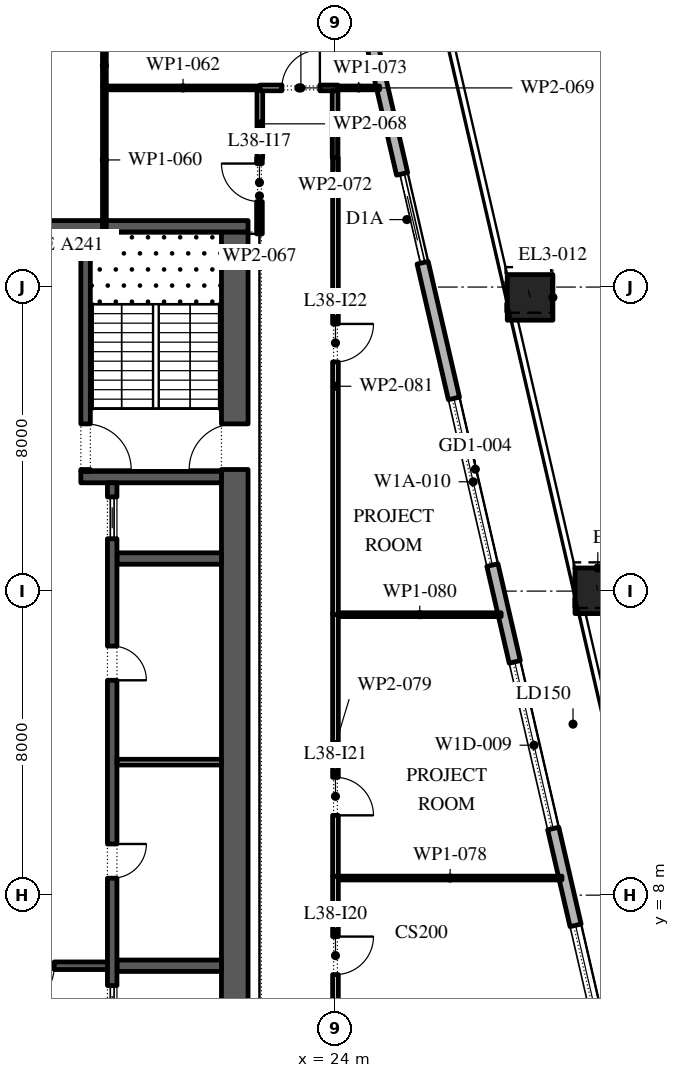
"""IFC4 building model, lengths in metres.
Left out: names, types, materials, properties, quantities, classifications, styles, units other than length and angle.
Written with IfcOpenShell. Run it as: python <this file> out.ifc"""

import sys

from ifc_helpers import new_model, si_unit, direction, frame, frame_2d, origin, origin_2d, place, context, subcontext, project, spatial, rectangle, extrude, element, fill, save


model = new_model("IFC4")
c1 = context("Model", 3, precision=1e-05, world=origin(), true_north=direction((0.0, 1.0)))
c2 = subcontext(c1, "Body", "Model", "MODEL_VIEW")
j1 = project(units=[si_unit("LENGTHUNIT", "METRE"), si_unit("PLANEANGLEUNIT", "RADIAN")], contexts=[c1])
p1 = place(None, origin())
s1 = spatial("IfcSite", under=j1, at=p1, CompositionType="ELEMENT")
p2 = place(p1, origin())
s2 = spatial("IfcBuilding", under=s1, at=p2, CompositionType="ELEMENT")
p3 = place(p2, frame((0.0, 0.0, 175.8)))
s3 = spatial("IfcBuildingStorey", under=s2, at=p3, CompositionType="ELEMENT", Elevation=175.8)
p4 = place(p3, frame((30.903, 16.009, 0.0), z_axis=(-0.0080747472, 0.035087390713, 0.999351626541), x_axis=(-0.974526982896, -0.224270282488, 0.0)))
e1 = element("IfcColumn", 1, at=p4, inside=s3, PredefinedType="COLUMN", context=c2, shape_type="SweptSolid", body=[
    extrude(rectangle(XDim=1.2, YDim=1.2, at=origin_2d()), origin(), (0.0, 0.0, 1.0), 4.203),
])
p5 = place(p3, frame((29.121, 23.728, 0.0), z_axis=(-0.010799619665, 0.046740289408, 0.998848694028), x_axis=(-0.974329962248, -0.225124686929, 0.0)))
e2 = element("IfcColumn", 2, at=p5, inside=s3, PredefinedType="COLUMN", context=c2, shape_type="SweptSolid", body=[
    extrude(rectangle(XDim=1.2, YDim=1.2, at=origin_2d()), origin(), (0.0, 0.0, 1.0), 4.205),
])
p6 = place(p3, frame((33.157, -5.092, 0.0), z_axis=(0.0, 0.0, 1.0), x_axis=(-0.224950279389, 0.974370243697, 0.0)))
e3 = element("IfcWall", 3, at=p6, inside=s3, PredefinedType="STANDARD", context=c2, shape_type="SweptSolid", body=[
    extrude(rectangle(XDim=49.5, YDim=0.3, at=frame_2d((24.75, 0.0))), origin(), (0.0, 0.0, 1.0), 4.0),
])
p7 = place(p6, frame((2.207, 0.0, 0.0)))
e4 = element("IfcOpeningElement", 4, at=p7, cuts=e3, PredefinedType="OPENING", context=c2, shape_type="SweptSolid", body=[
    extrude(rectangle(XDim=2.4, YDim=3.125, at=frame_2d((1.2, 1.562))), frame((0.0, 0.16, 0.0), z_axis=(0.0, -1.0, 0.0), x_axis=(1.0, 0.0, 0.0)), (0.0, 0.0, 1.0), 0.32),
])
p8 = place(p6, frame((8.121, 0.0, 0.45)))
e5 = element("IfcOpeningElement", 5, at=p8, cuts=e3, PredefinedType="OPENING", context=c2, shape_type="SweptSolid", body=[
    extrude(rectangle(XDim=4.5, YDim=2.875, at=frame_2d((2.25, 1.438))), frame((0.0, 0.16, 0.0), z_axis=(0.0, -1.0, 0.0), x_axis=(1.0, 0.0, 0.0)), (0.0, 0.0, 1.0), 0.32),
])
p9 = place(p6, frame((15.236, 0.0, 0.45)))
e6 = element("IfcOpeningElement", 6, at=p9, cuts=e3, PredefinedType="OPENING", context=c2, shape_type="SweptSolid", body=[
    extrude(rectangle(XDim=4.5, YDim=2.875, at=frame_2d((2.25, 1.438))), frame((0.0, 0.16, 0.0), z_axis=(0.0, -1.0, 0.0), x_axis=(1.0, 0.0, 0.0)), (0.0, 0.0, 1.0), 0.32),
])
p10 = place(p6, frame((22.35, 0.0, 0.45)))
e7 = element("IfcOpeningElement", 7, at=p10, cuts=e3, PredefinedType="OPENING", context=c2, shape_type="SweptSolid", body=[
    extrude(rectangle(XDim=4.5, YDim=3.0, at=frame_2d((2.25, 1.5))), frame((0.0, 0.16, 0.0), z_axis=(0.0, -1.0, 0.0), x_axis=(1.0, 0.0, 0.0)), (0.0, 0.0, 1.0), 0.32),
])
p11 = place(p6, frame((30.514, 0.0, 0.0)))
e8 = element("IfcOpeningElement", 8, at=p11, cuts=e3, PredefinedType="OPENING", context=c2, shape_type="SweptSolid", body=[
    extrude(rectangle(XDim=2.4, YDim=3.45, at=frame_2d((1.2, 1.725))), frame((0.0, 0.16, 0.0), z_axis=(0.0, -1.0, 0.0), x_axis=(1.0, 0.0, 0.0)), (0.0, 0.0, 1.0), 0.32),
])
p12 = place(p6, frame((36.579, 0.0, 0.45)))
e9 = element("IfcOpeningElement", 9, at=p12, cuts=e3, PredefinedType="OPENING", context=c2, shape_type="SweptSolid", body=[
    extrude(rectangle(XDim=4.5, YDim=3.05, at=frame_2d((2.25, 1.525))), frame((0.0, 0.16, 0.0), z_axis=(0.0, -1.0, 0.0), x_axis=(1.0, 0.0, 0.0)), (0.0, 0.0, 1.0), 0.32),
])
p13 = place(p6, frame((43.693, 0.0, 0.45)))
e10 = element("IfcOpeningElement", 10, at=p13, cuts=e3, PredefinedType="OPENING", context=c2, shape_type="SweptSolid", body=[
    extrude(rectangle(XDim=4.5, YDim=3.05, at=frame_2d((2.25, 1.525))), frame((0.0, 0.16, 0.0), z_axis=(0.0, -1.0, 0.0), x_axis=(1.0, 0.0, 0.0)), (0.0, 0.0, 1.0), 0.32),
])
p14 = place(p3, frame((21.35, -2.45, 0.0), z_axis=(0.0, 0.0, 1.0), x_axis=(0.0, 1.0, 0.0)))
e11 = element("IfcWall", 11, at=p14, inside=s3, PredefinedType="SHEAR", context=c2, shape_type="SweptSolid", body=[
    extrude(rectangle(XDim=27.9, YDim=0.7, at=frame_2d((13.95, 0.0))), origin(), (0.0, 0.0, 1.0), 4.0),
])
p15 = place(p14, frame((5.05, 0.0, 0.0)))
e12 = element("IfcOpeningElement", 12, at=p15, cuts=e11, PredefinedType="OPENING", context=c2, shape_type="SweptSolid", body=[
    extrude(rectangle(XDim=1.2, YDim=2.1, at=frame_2d((0.6, 1.05))), frame((0.0, 0.36, 0.0), z_axis=(0.0, -1.0, 0.0), x_axis=(1.0, 0.0, 0.0)), (0.0, 0.0, 1.0), 0.72),
])
p16 = place(p14, frame((21.65, 0.0, 0.0)))
e13 = element("IfcOpeningElement", 13, at=p16, cuts=e11, PredefinedType="OPENING", context=c2, shape_type="SweptSolid", body=[
    extrude(rectangle(XDim=1.2, YDim=2.1, at=frame_2d((0.6, 1.05))), frame((0.0, 0.36, 0.0), z_axis=(0.0, -1.0, 0.0), x_axis=(1.0, 0.0, 0.0)), (0.0, 0.0, 1.0), 0.72),
])
p17 = place(p3, frame((10.3, 25.6, 0.0), z_axis=(0.0, 0.0, 1.0), x_axis=(1.0, 0.0, 0.0)))
e14 = element("IfcWall", 14, at=p17, inside=s3, PredefinedType="SHEAR", context=c2, shape_type="SweptSolid", body=[
    extrude(rectangle(XDim=11.4, YDim=0.3, at=frame_2d((5.7, 0.0))), origin(), (0.0, 0.0, 1.0), 4.0),
])
p18 = place(p3, frame((17.3, 19.0, 0.0), z_axis=(0.0, 0.0, 1.0), x_axis=(1.0, 0.0, 0.0)))
e15 = element("IfcWall", 15, at=p18, inside=s3, PredefinedType="SHEAR", context=c2, shape_type="SweptSolid", body=[
    extrude(rectangle(XDim=3.7, YDim=0.3, at=frame_2d((1.85, 0.0))), origin(), (0.0, 0.0, 1.0), 4.0),
])
p19 = place(p3, frame((17.425, 19.15, 0.0), z_axis=(0.0, 0.0, 1.0), x_axis=(0.0, 1.0, 0.0)))
e16 = element("IfcWall", 16, at=p19, inside=s3, PredefinedType="SHEAR", context=c2, shape_type="SweptSolid", body=[
    extrude(rectangle(XDim=6.3, YDim=0.25, at=frame_2d((3.15, 0.0))), origin(), (0.0, 0.0, 1.0), 4.0),
])
p20 = place(p19, frame((0.05, 0.0, 0.0)))
e17 = element("IfcOpeningElement", 17, at=p20, cuts=e16, PredefinedType="OPENING", context=c2, shape_type="SweptSolid", body=[
    extrude(rectangle(XDim=1.2, YDim=2.1, at=frame_2d((0.6, 1.05))), frame((0.0, 0.135, 0.0), z_axis=(0.0, -1.0, 0.0), x_axis=(1.0, 0.0, 0.0)), (0.0, 0.0, 1.0), 0.27),
])
for number, where, z_axis, x_axis in (
    (18, (18.25, 6.143, 0.0), (0.0, 0.0, 1.0), (1.0, 0.0, 0.0)),
    (19, (18.25, 16.857, 0.0), (0.0, 0.0, 1.0), (1.0, 0.0, 0.0)),
):
    element("IfcWall", number, at=place(p3, frame(where, z_axis=z_axis, x_axis=x_axis)), inside=s3, PredefinedType="SHEAR", context=c2, shape_type="SweptSolid", body=[
        extrude(rectangle(XDim=2.75, YDim=0.3, at=frame_2d((1.375, 0.0))), origin(), (0.0, 0.0, 1.0), 4.0),
    ])
p21 = place(p3, frame((18.125, 4.15, 0.0), z_axis=(0.0, 0.0, 1.0), x_axis=(0.0, 1.0, 0.0)))
e20 = element("IfcWall", 20, at=p21, inside=s3, PredefinedType="SHEAR", context=c2, shape_type="SweptSolid", body=[
    extrude(rectangle(XDim=14.7, YDim=0.25, at=frame_2d((7.35, 0.0))), origin(), (0.0, 0.0, 1.0), 4.0),
])
p22 = place(p21, frame((4.296, 0.0, 0.0)))
e21 = element("IfcOpeningElement", 21, at=p22, cuts=e20, PredefinedType="OPENING", context=c2, shape_type="SweptSolid", body=[
    extrude(rectangle(XDim=0.9, YDim=2.1, at=frame_2d((0.45, 1.05))), frame((0.0, 0.135, 0.0), z_axis=(0.0, -1.0, 0.0), x_axis=(1.0, 0.0, 0.0)), (0.0, 0.0, 1.0), 0.27),
])
p23 = place(p21, frame((9.504, 0.0, 0.0)))
e22 = element("IfcOpeningElement", 22, at=p23, cuts=e20, PredefinedType="OPENING", context=c2, shape_type="SweptSolid", body=[
    extrude(rectangle(XDim=0.9, YDim=2.1, at=frame_2d((0.45, 1.05))), frame((0.0, 0.135, 0.0), z_axis=(0.0, -1.0, 0.0), x_axis=(1.0, 0.0, 0.0)), (0.0, 0.0, 1.0), 0.27),
])
p24 = place(p21, frame((0.371, 0.0, 0.0)))
e23 = element("IfcOpeningElement", 23, at=p24, cuts=e20, PredefinedType="OPENING", context=c2, shape_type="SweptSolid", body=[
    extrude(rectangle(XDim=1.1, YDim=2.1, at=frame_2d((0.55, 1.05))), frame((0.0, 0.135, 0.0), z_axis=(0.0, -1.0, 0.0), x_axis=(1.0, 0.0, 0.0)), (0.0, 0.0, 1.0), 0.27),
])
p25 = place(p21, frame((13.229, 0.0, 0.0)))
e24 = element("IfcOpeningElement", 24, at=p25, cuts=e20, PredefinedType="OPENING", context=c2, shape_type="SweptSolid", body=[
    extrude(rectangle(XDim=1.1, YDim=2.1, at=frame_2d((0.55, 1.05))), frame((0.0, 0.135, 0.0), z_axis=(0.0, -1.0, 0.0), x_axis=(1.0, 0.0, 0.0)), (0.0, 0.0, 1.0), 0.27),
])
p26 = place(p3, frame((18.25, 11.5, 0.0), z_axis=(0.0, 0.0, 1.0), x_axis=(1.0, 0.0, 0.0)))
e25 = element("IfcWall", 25, at=p26, inside=s3, PredefinedType="PARTITIONING", context=c2, shape_type="SweptSolid", body=[
    extrude(rectangle(XDim=2.75, YDim=0.15, at=frame_2d((1.375, 0.0))), origin(), (0.0, 0.0, 1.0), 4.0),
])
p27 = place(p3, frame((14.0, 6.143, 0.0), z_axis=(0.0, 0.0, 1.0), x_axis=(1.0, 0.0, 0.0)))
e26 = element("IfcWall", 26, at=p27, inside=s3, PredefinedType="SHEAR", context=c2, shape_type="SweptSolid", body=[
    extrude(rectangle(XDim=4.0, YDim=0.2, at=frame_2d((2.0, 0.0))), origin(), (0.0, 0.0, 1.0), 4.0),
])
p28 = place(p27, frame((1.4, 0.0, 0.0)))
e27 = element("IfcOpeningElement", 27, at=p28, cuts=e26, PredefinedType="OPENING", context=c2, shape_type="SweptSolid", body=[
    extrude(rectangle(XDim=1.2, YDim=2.1, at=frame_2d((0.6, 1.05))), frame((0.0, 0.11, 0.0), z_axis=(0.0, -1.0, 0.0), x_axis=(1.0, 0.0, 0.0)), (0.0, 0.0, 1.0), 0.22),
])
p29 = place(p3, frame((17.92, 25.4, 0.0), z_axis=(0.0, 0.0, 1.0), x_axis=(0.0, 1.0, 0.0)))
e28 = element("IfcWall", 28, at=p29, inside=s3, PredefinedType="PARTITIONING", context=c2, shape_type="SweptSolid", body=[
    extrude(rectangle(XDim=3.89, YDim=0.1, at=frame_2d((1.945, 0.0))), origin(), (0.0, 0.0, 1.0), 4.0),
])
p30 = place(p3, frame((17.92, 29.29, 0.0), z_axis=(0.0, 0.0, 1.0), x_axis=(0.0, 1.0, 0.0)))
e29 = element("IfcWall", 29, at=p30, inside=s3, PredefinedType="PARTITIONING", context=c2, shape_type="SweptSolid", body=[
    extrude(rectangle(XDim=1.08, YDim=0.1, at=frame_2d((0.54, 0.0))), origin(), (0.0, 0.0, 1.0), 4.0),
])
p31 = place(p3, frame((17.97, 29.24, 0.0), z_axis=(0.0, 0.0, 1.0), x_axis=(1.0, 0.0, 0.0)))
e30 = element("IfcWall", 30, at=p31, inside=s3, PredefinedType="PARTITIONING", context=c2, shape_type="SweptSolid", body=[
    extrude(rectangle(XDim=4.04, YDim=0.1, at=frame_2d((2.02, 0.0))), origin(), (0.0, 0.0, 1.0), 4.0),
])
p32 = place(p3, frame((22.0, 25.4, 0.0), z_axis=(0.0, 0.0, 1.0), x_axis=(0.0, 1.0, 0.0)))
e31 = element("IfcWall", 31, at=p32, inside=s3, PredefinedType="PARTITIONING", context=c2, shape_type="SweptSolid", body=[
    extrude(rectangle(XDim=2.0, YDim=0.15, at=frame_2d((1.0, 0.0))), origin(), (0.0, 0.0, 1.0), 4.0),
])
p33 = place(p32, frame((0.85, 0.0, 0.0)))
e32 = element("IfcOpeningElement", 32, at=p33, cuts=e31, PredefinedType="OPENING", context=c2, shape_type="SweptSolid", body=[
    extrude(rectangle(XDim=1.0, YDim=2.1, at=frame_2d((0.5, 1.05))), frame((0.0, 0.085, 0.0), z_axis=(0.0, -1.0, 0.0), x_axis=(1.0, 0.0, 0.0)), (0.0, 0.0, 1.0), 0.17),
])
p34 = place(p3, frame((22.01, 27.4, 0.0), z_axis=(0.0, 0.0, 1.0), x_axis=(0.0, 1.0, 0.0)))
e33 = element("IfcWall", 33, at=p34, inside=s3, PredefinedType="PARTITIONING", context=c2, shape_type="SweptSolid", body=[
    extrude(rectangle(XDim=1.79, YDim=0.15, at=frame_2d((0.895, 0.0))), origin(), (0.0, 0.0, 1.0), 4.0),
])
p35 = place(p3, frame((22.01, 29.24, 0.0), z_axis=(0.0, 0.0, 1.0), x_axis=(1.0, 0.0, 0.0)))
e34 = element("IfcWall", 34, at=p35, inside=s3, PredefinedType="PARTITIONING", context=c2, shape_type="SweptSolid", body=[
    extrude(rectangle(XDim=2.055, YDim=0.15, at=frame_2d((1.027, 0.0))), origin(), (0.0, 0.0, 1.0), 4.0),
])
p36 = place(p35, frame((0.58, 0.0, 0.0)))
e35 = element("IfcOpeningElement", 35, at=p36, cuts=e34, PredefinedType="OPENING", context=c2, shape_type="SweptSolid", body=[
    extrude(rectangle(XDim=1.0, YDim=2.1, at=frame_2d((0.5, 1.05))), frame((0.0, 0.085, 0.0), z_axis=(0.0, -1.0, 0.0), x_axis=(1.0, 0.0, 0.0)), (0.0, 0.0, 1.0), 0.17),
])
p37 = place(p3, frame((23.99, 29.165, 0.0), z_axis=(0.0, 0.0, 1.0), x_axis=(0.0, -1.0, 0.0)))
e36 = element("IfcWall", 36, at=p37, inside=s3, PredefinedType="PARTITIONING", context=c2, shape_type="SweptSolid", body=[
    extrude(rectangle(XDim=1.765, YDim=0.15, at=frame_2d((0.883, 0.0))), origin(), (0.0, 0.0, 1.0), 4.0),
])
p38 = place(p3, frame((24.065, 29.24, 0.0), z_axis=(0.0, 0.0, 1.0), x_axis=(1.0, 0.0, 0.0)))
e37 = element("IfcWall", 37, at=p38, inside=s3, PredefinedType="PARTITIONING", context=c2, shape_type="SweptSolid", body=[
    extrude(rectangle(XDim=1.095, YDim=0.1, at=frame_2d((0.547, 0.0))), origin(), (0.0, 0.0, 1.0), 4.0),
])
p39 = place(p3, frame((24.0, 8.5, 0.0), z_axis=(0.0, 0.0, 1.0), x_axis=(0.0, -1.0, 0.0)))
e38 = element("IfcWall", 38, at=p39, inside=s3, PredefinedType="PARTITIONING", context=c2, shape_type="SweptSolid", body=[
    extrude(rectangle(XDim=6.99, YDim=0.15, at=frame_2d((3.495, 0.0))), origin(), (0.0, 0.0, 1.0), 4.0),
])
p40 = place(p39, frame((1.59, 0.0, 0.0)))
e39 = element("IfcOpeningElement", 39, at=p40, cuts=e38, PredefinedType="OPENING", context=c2, shape_type="SweptSolid", body=[
    extrude(rectangle(XDim=1.0, YDim=2.1, at=frame_2d((0.5, 1.05))), frame((0.0, 0.085, 0.0), z_axis=(0.0, -1.0, 0.0), x_axis=(1.0, 0.0, 0.0)), (0.0, 0.0, 1.0), 0.17),
])
p41 = place(p3, frame((24.075, 8.45, 0.0), z_axis=(0.0, 0.0, 1.0), x_axis=(1.0, 0.0, 0.0)))
e40 = element("IfcWall", 40, at=p41, inside=s3, PredefinedType="PARTITIONING", context=c2, shape_type="SweptSolid", body=[
    extrude(rectangle(XDim=5.884, YDim=0.1, at=frame_2d((2.942, 0.0))), origin(), (0.0, 0.0, 1.0), 4.0),
])
p42 = place(p3, frame((24.0, 15.43, 0.0), z_axis=(0.0, 0.0, 1.0), x_axis=(0.0, -1.0, 0.0)))
e41 = element("IfcWall", 41, at=p42, inside=s3, PredefinedType="PARTITIONING", context=c2, shape_type="SweptSolid", body=[
    extrude(rectangle(XDim=6.93, YDim=0.15, at=frame_2d((3.465, 0.0))), origin(), (0.0, 0.0, 1.0), 4.0),
])
p43 = place(p42, frame((4.33, 0.0, 0.0)))
e42 = element("IfcOpeningElement", 42, at=p43, cuts=e41, PredefinedType="OPENING", context=c2, shape_type="SweptSolid", body=[
    extrude(rectangle(XDim=1.0, YDim=2.1, at=frame_2d((0.5, 1.05))), frame((0.0, 0.085, 0.0), z_axis=(0.0, -1.0, 0.0), x_axis=(1.0, 0.0, 0.0)), (0.0, 0.0, 1.0), 0.17),
])
p44 = place(p3, frame((24.075, 15.38, 0.0), z_axis=(0.0, 0.0, 1.0), x_axis=(1.0, 0.0, 0.0)))
e43 = element("IfcWall", 43, at=p44, inside=s3, PredefinedType="PARTITIONING", context=c2, shape_type="SweptSolid", body=[
    extrude(rectangle(XDim=4.285, YDim=0.1, at=frame_2d((2.143, 0.0))), origin(), (0.0, 0.0, 1.0), 4.0),
])
p45 = place(p3, frame((24.0, 27.4, 0.0), z_axis=(0.0, 0.0, 1.0), x_axis=(0.0, -1.0, 0.0)))
e44 = element("IfcWall", 44, at=p45, inside=s3, PredefinedType="PARTITIONING", context=c2, shape_type="SweptSolid", body=[
    extrude(rectangle(XDim=12.02, YDim=0.15, at=frame_2d((6.01, 0.0))), origin(), (0.0, 0.0, 1.0), 4.0),
])
p46 = place(p45, frame((4.37, 0.0, 0.0)))
e45 = element("IfcOpeningElement", 45, at=p46, cuts=e44, PredefinedType="OPENING", context=c2, shape_type="SweptSolid", body=[
    extrude(rectangle(XDim=1.0, YDim=2.1, at=frame_2d((0.5, 1.05))), frame((0.0, 0.085, 0.0), z_axis=(0.0, -1.0, 0.0), x_axis=(1.0, 0.0, 0.0)), (0.0, 0.0, 1.0), 0.17),
])
p47 = place(p8, origin())
e46 = element("IfcWindow", 46, at=p47, inside=s3, PartitioningType="DOUBLE_PANEL_VERTICAL", PredefinedType="WINDOW", context=c2, shape_type="SweptSolid", body=[
    extrude(rectangle(XDim=4.5, YDim=2.875, at=frame_2d((2.25, 1.438))), frame((0.0, 0.03, 0.0), z_axis=(0.0, -1.0, 0.0), x_axis=(1.0, 0.0, 0.0)), (0.0, 0.0, 1.0), 0.06),
])
fill(e5, e46)
p48 = place(p9, origin())
e47 = element("IfcWindow", 47, at=p48, inside=s3, PartitioningType="DOUBLE_PANEL_VERTICAL", PredefinedType="WINDOW", context=c2, shape_type="SweptSolid", body=[
    extrude(rectangle(XDim=4.5, YDim=2.875, at=frame_2d((2.25, 1.438))), frame((0.0, 0.03, 0.0), z_axis=(0.0, -1.0, 0.0), x_axis=(1.0, 0.0, 0.0)), (0.0, 0.0, 1.0), 0.06),
])
fill(e6, e47)
p49 = place(p10, origin())
e48 = element("IfcWindow", 48, at=p49, inside=s3, PartitioningType="DOUBLE_PANEL_VERTICAL", PredefinedType="WINDOW", context=c2, shape_type="SweptSolid", body=[
    extrude(rectangle(XDim=4.5, YDim=3.0, at=frame_2d((2.25, 1.5))), frame((0.0, 0.03, 0.0), z_axis=(0.0, -1.0, 0.0), x_axis=(1.0, 0.0, 0.0)), (0.0, 0.0, 1.0), 0.06),
])
fill(e7, e48)
p50 = place(p11, origin())
e49 = element("IfcDoor", 49, at=p50, inside=s3, OperationType="DOUBLE_DOOR_SLIDING", PredefinedType="DOOR", context=c2, shape_type="SweptSolid", body=[
    extrude(rectangle(XDim=2.4, YDim=3.45, at=frame_2d((1.2, 1.725))), frame((0.0, 0.025, 0.0), z_axis=(0.0, -1.0, 0.0), x_axis=(1.0, 0.0, 0.0)), (0.0, 0.0, 1.0), 0.05),
])
fill(e8, e49)
p51 = place(p22, frame((0.9, -0.2, 0.0), z_axis=(0.0, 0.0, 1.0), x_axis=(-1.0, 0.0, 0.0)))
e50 = element("IfcDoor", 50, at=p51, inside=s3, OperationType="SINGLE_SWING_RIGHT", PredefinedType="DOOR", context=c2, shape_type="SweptSolid", body=[
    extrude(rectangle(XDim=0.9, YDim=2.1, at=frame_2d((0.45, 1.05))), frame((0.0, -0.075, 0.0), z_axis=(0.0, -1.0, 0.0), x_axis=(1.0, 0.0, 0.0)), (0.0, 0.0, 1.0), 0.05),
])
fill(e21, e50)
p52 = place(p23, frame((0.9, -0.2, 0.0), z_axis=(0.0, 0.0, 1.0), x_axis=(-1.0, 0.0, 0.0)))
e51 = element("IfcDoor", 51, at=p52, inside=s3, OperationType="SINGLE_SWING_LEFT", PredefinedType="DOOR", context=c2, shape_type="SweptSolid", body=[
    extrude(rectangle(XDim=0.9, YDim=2.1, at=frame_2d((0.45, 1.05))), frame((0.0, -0.075, 0.0), z_axis=(0.0, -1.0, 0.0), x_axis=(1.0, 0.0, 0.0)), (0.0, 0.0, 1.0), 0.05),
])
fill(e22, e51)
p53 = place(p24, origin())
e52 = element("IfcDoor", 52, at=p53, inside=s3, OperationType="SLIDING_TO_LEFT", PredefinedType="DOOR", context=c2, shape_type="SweptSolid", body=[
    extrude(rectangle(XDim=1.1, YDim=2.1, at=frame_2d((0.55, 1.05))), frame((0.0, 0.025, 0.0), z_axis=(0.0, -1.0, 0.0), x_axis=(1.0, 0.0, 0.0)), (0.0, 0.0, 1.0), 0.05),
])
fill(e23, e52)
p54 = place(p25, origin())
e53 = element("IfcDoor", 53, at=p54, inside=s3, OperationType="SLIDING_TO_LEFT", PredefinedType="DOOR", context=c2, shape_type="SweptSolid", body=[
    extrude(rectangle(XDim=1.1, YDim=2.1, at=frame_2d((0.55, 1.05))), frame((0.0, 0.025, 0.0), z_axis=(0.0, -1.0, 0.0), x_axis=(1.0, 0.0, 0.0)), (0.0, 0.0, 1.0), 0.05),
])
fill(e24, e53)
p55 = place(p28, frame((1.2, 0.0, 0.0), z_axis=(0.0, 0.0, 1.0), x_axis=(-1.0, 0.0, 0.0)))
e54 = element("IfcDoor", 54, at=p55, inside=s3, OperationType="SINGLE_SWING_LEFT", PredefinedType="DOOR", context=c2, shape_type="SweptSolid", body=[
    extrude(rectangle(XDim=1.2, YDim=2.1, at=frame_2d((0.6, 1.05))), frame((0.0, 0.025, 0.0), z_axis=(0.0, -1.0, 0.0), x_axis=(1.0, 0.0, 0.0)), (0.0, 0.0, 1.0), 0.05),
])
fill(e27, e54)
p56 = place(p20, frame((1.2, 0.0, 0.0), z_axis=(0.0, 0.0, 1.0), x_axis=(-1.0, 0.0, 0.0)))
e55 = element("IfcDoor", 55, at=p56, inside=s3, OperationType="SINGLE_SWING_LEFT", PredefinedType="DOOR", context=c2, shape_type="SweptSolid", body=[
    extrude(rectangle(XDim=1.2, YDim=2.1, at=frame_2d((0.6, 1.05))), frame((0.0, 0.025, 0.0), z_axis=(0.0, -1.0, 0.0), x_axis=(1.0, 0.0, 0.0)), (0.0, 0.0, 1.0), 0.05),
])
fill(e17, e55)
p57 = place(p16, origin())
e56 = element("IfcDoor", 56, at=p57, inside=s3, OperationType="SINGLE_SWING_RIGHT", PredefinedType="DOOR", context=c2, shape_type="SweptSolid", body=[
    extrude(rectangle(XDim=1.2, YDim=2.1, at=frame_2d((0.6, 1.05))), frame((0.0, 0.025, 0.0), z_axis=(0.0, -1.0, 0.0), x_axis=(1.0, 0.0, 0.0)), (0.0, 0.0, 1.0), 0.05),
])
fill(e13, e56)
p58 = place(p33, origin())
e57 = element("IfcDoor", 57, at=p58, inside=s3, OperationType="SINGLE_SWING_LEFT", PredefinedType="DOOR", context=c2, shape_type="SweptSolid", body=[
    extrude(rectangle(XDim=1.0, YDim=2.1, at=frame_2d((0.5, 1.05))), frame((0.0, 0.025, 0.0), z_axis=(0.0, -1.0, 0.0), x_axis=(1.0, 0.0, 0.0)), (0.0, 0.0, 1.0), 0.05),
])
fill(e32, e57)
p59 = place(p40, origin())
e58 = element("IfcDoor", 58, at=p59, inside=s3, OperationType="SINGLE_SWING_RIGHT", PredefinedType="DOOR", context=c2, shape_type="SweptSolid", body=[
    extrude(rectangle(XDim=1.0, YDim=2.1, at=frame_2d((0.5, 1.05))), frame((0.0, 0.025, 0.0), z_axis=(0.0, -1.0, 0.0), x_axis=(1.0, 0.0, 0.0)), (0.0, 0.0, 1.0), 0.05),
])
fill(e39, e58)
p60 = place(p43, origin())
e59 = element("IfcDoor", 59, at=p60, inside=s3, OperationType="SINGLE_SWING_LEFT", PredefinedType="DOOR", context=c2, shape_type="SweptSolid", body=[
    extrude(rectangle(XDim=1.0, YDim=2.1, at=frame_2d((0.5, 1.05))), frame((0.0, 0.025, 0.0), z_axis=(0.0, -1.0, 0.0), x_axis=(1.0, 0.0, 0.0)), (0.0, 0.0, 1.0), 0.05),
])
fill(e42, e59)
p61 = place(p46, origin())
e60 = element("IfcDoor", 60, at=p61, inside=s3, OperationType="SINGLE_SWING_RIGHT", PredefinedType="DOOR", context=c2, shape_type="SweptSolid", body=[
    extrude(rectangle(XDim=1.0, YDim=2.1, at=frame_2d((0.5, 1.05))), frame((0.0, 0.025, 0.0), z_axis=(0.0, -1.0, 0.0), x_axis=(1.0, 0.0, 0.0)), (0.0, 0.0, 1.0), 0.05),
])
fill(e45, e60)
p62 = place(p36, origin())
e61 = element("IfcDoor", 61, at=p62, inside=s3, OperationType="SINGLE_SWING_LEFT", PredefinedType="DOOR", context=c2, shape_type="SweptSolid", body=[
    extrude(rectangle(XDim=1.0, YDim=2.1, at=frame_2d((0.5, 1.05))), frame((0.0, 0.025, 0.0), z_axis=(0.0, -1.0, 0.0), x_axis=(1.0, 0.0, 0.0)), (0.0, 0.0, 1.0), 0.05),
])
fill(e35, e61)
save(model, sys.argv[1])
